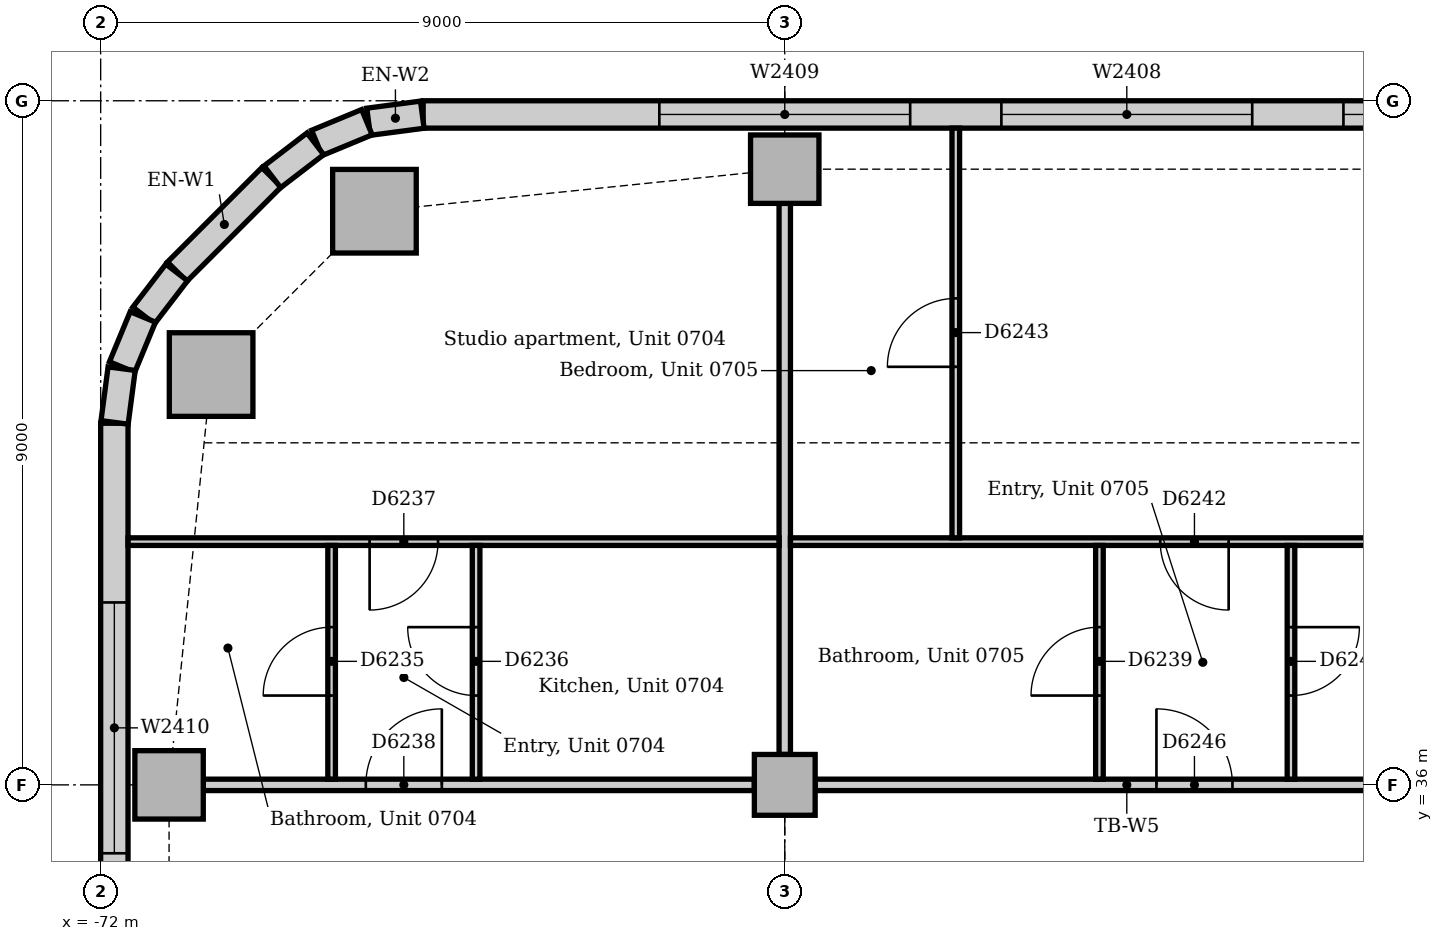
"""IFC4 building model, lengths in metres.
Left out: names, types, materials, properties, quantities, classifications, styles, units other than length and angle.
Written with IfcOpenShell. Run it as: python <this file> out.ifc"""

import sys

from ifc_helpers import new_model, si_unit, direction, frame, frame_2d, origin, origin_2d, place, context, subcontext, project, spatial, rectangle, extrude, element, fill, save


model = new_model("IFC4")
c1 = context("Model", 3, precision=1e-05, world=origin(), true_north=direction((0.0, 1.0)))
c2 = subcontext(c1, "Body", "Model", "MODEL_VIEW")
j1 = project(units=[si_unit("LENGTHUNIT", "METRE"), si_unit("PLANEANGLEUNIT", "RADIAN")], contexts=[c1])
p1 = place(None, origin())
s1 = spatial("IfcSite", under=j1, at=p1, CompositionType="ELEMENT")
p2 = place(p1, origin())
s2 = spatial("IfcBuilding", under=s1, at=p2, CompositionType="ELEMENT")
p3 = place(p2, frame((0.0, 0.0, 34.0)))
s3 = spatial("IfcBuildingStorey", under=s2, at=p3, CompositionType="ELEMENT", Elevation=34.0)
for number, where, z_axis, x_axis in (
    (1, (-68.398, 43.547, 0.0), (0.0, 0.0, 1.0), (1.0, 0.0, 0.0)),
    (2, (-70.547, 41.398, 0.0), (0.0, 0.0, 1.0), (1.0, 0.0, 0.0)),
):
    element("IfcColumn", number, at=place(p3, frame(where, z_axis=z_axis, x_axis=x_axis)), inside=s3, PredefinedType="COLUMN", context=c2, shape_type="SweptSolid", body=[
        extrude(rectangle(XDim=1.1, YDim=1.1, at=origin_2d()), origin(), (0.0, 0.0, 1.0), 3.85),
    ])
for number, where, z_axis, x_axis in (
    (3, (-63.0, 44.1, 0.0), (0.0, 0.0, 1.0), (1.0, 0.0, 0.0)),
    (4, (-71.1, 36.0, 0.0), (0.0, 0.0, 1.0), (1.0, 0.0, 0.0)),
):
    element("IfcColumn", number, at=place(p3, frame(where, z_axis=z_axis, x_axis=x_axis)), inside=s3, PredefinedType="COLUMN", context=c2, shape_type="SweptSolid", body=[
        extrude(rectangle(XDim=0.9, YDim=0.9, at=origin_2d()), origin(), (0.0, 0.0, 1.0), 3.85),
    ])
p4 = place(p3, frame((-63.0, 36.0, 0.0), z_axis=(0.0, 0.0, 1.0), x_axis=(1.0, 0.0, 0.0)))
e5 = element("IfcColumn", 5, at=p4, inside=s3, PredefinedType="COLUMN", context=c2, shape_type="SweptSolid", body=[
    extrude(rectangle(XDim=0.8, YDim=0.8, at=origin_2d()), origin(), (0.0, 0.0, 1.0), 3.85),
])
p5 = place(p3, frame((-31.243, 44.82, 0.0), z_axis=(0.0, 0.0, 1.0), x_axis=(-1.0, 0.0, 0.0)))
e6 = element("IfcWall", 6, at=p5, inside=s3, PredefinedType="STANDARD", context=c2, shape_type="SweptSolid", body=[
    extrude(rectangle(XDim=36.515, YDim=0.36, at=frame_2d((18.257, 0.0))), origin(), (0.0, 0.0, 1.0), 3.85),
])
p6 = place(p5, frame((3.107, 0.0, 0.9)))
e7 = element("IfcOpeningElement", 7, at=p6, cuts=e6, PredefinedType="OPENING", context=c2, shape_type="SweptSolid", body=[
    extrude(rectangle(XDim=3.3, YDim=1.6, at=frame_2d((1.65, 0.8))), frame((0.0, 0.19, 0.0), z_axis=(0.0, -1.0, 0.0), x_axis=(1.0, 0.0, 0.0)), (0.0, 0.0, 1.0), 0.38),
])
p7 = place(p5, frame((7.607, 0.0, 0.9)))
e8 = element("IfcOpeningElement", 8, at=p7, cuts=e6, PredefinedType="OPENING", context=c2, shape_type="SweptSolid", body=[
    extrude(rectangle(XDim=3.3, YDim=1.6, at=frame_2d((1.65, 0.8))), frame((0.0, 0.19, 0.0), z_axis=(0.0, -1.0, 0.0), x_axis=(1.0, 0.0, 0.0)), (0.0, 0.0, 1.0), 0.38),
])
p8 = place(p5, frame((12.107, 0.0, 0.9)))
e9 = element("IfcOpeningElement", 9, at=p8, cuts=e6, PredefinedType="OPENING", context=c2, shape_type="SweptSolid", body=[
    extrude(rectangle(XDim=3.3, YDim=1.6, at=frame_2d((1.65, 0.8))), frame((0.0, 0.19, 0.0), z_axis=(0.0, -1.0, 0.0), x_axis=(1.0, 0.0, 0.0)), (0.0, 0.0, 1.0), 0.38),
])
p9 = place(p5, frame((16.607, 0.0, 0.9)))
e10 = element("IfcOpeningElement", 10, at=p9, cuts=e6, PredefinedType="OPENING", context=c2, shape_type="SweptSolid", body=[
    extrude(rectangle(XDim=3.3, YDim=1.6, at=frame_2d((1.65, 0.8))), frame((0.0, 0.19, 0.0), z_axis=(0.0, -1.0, 0.0), x_axis=(1.0, 0.0, 0.0)), (0.0, 0.0, 1.0), 0.38),
])
p10 = place(p5, frame((21.107, 0.0, 0.9)))
e11 = element("IfcOpeningElement", 11, at=p10, cuts=e6, PredefinedType="OPENING", context=c2, shape_type="SweptSolid", body=[
    extrude(rectangle(XDim=3.3, YDim=1.6, at=frame_2d((1.65, 0.8))), frame((0.0, 0.19, 0.0), z_axis=(0.0, -1.0, 0.0), x_axis=(1.0, 0.0, 0.0)), (0.0, 0.0, 1.0), 0.38),
])
p11 = place(p5, frame((25.607, 0.0, 0.9)))
e12 = element("IfcOpeningElement", 12, at=p11, cuts=e6, PredefinedType="OPENING", context=c2, shape_type="SweptSolid", body=[
    extrude(rectangle(XDim=3.3, YDim=1.6, at=frame_2d((1.65, 0.8))), frame((0.0, 0.19, 0.0), z_axis=(0.0, -1.0, 0.0), x_axis=(1.0, 0.0, 0.0)), (0.0, 0.0, 1.0), 0.38),
])
p12 = place(p5, frame((30.107, 0.0, 0.9)))
e13 = element("IfcOpeningElement", 13, at=p12, cuts=e6, PredefinedType="OPENING", context=c2, shape_type="SweptSolid", body=[
    extrude(rectangle(XDim=3.3, YDim=1.6, at=frame_2d((1.65, 0.8))), frame((0.0, 0.19, 0.0), z_axis=(0.0, -1.0, 0.0), x_axis=(1.0, 0.0, 0.0)), (0.0, 0.0, 1.0), 0.38),
])
p13 = place(p3, frame((-69.751, 43.994, 0.0), z_axis=(0.0, 0.0, 1.0), x_axis=(-0.707106781187, -0.707106781187, 0.0)))
e14 = element("IfcWall", 14, at=p13, inside=s3, PredefinedType="STANDARD", context=c2, shape_type="SweptSolid", body=[
    extrude(rectangle(XDim=1.757, YDim=0.36, at=frame_2d((0.879, 0.0))), origin(), (0.0, 0.0, 1.0), 3.85),
])
p14 = place(p3, frame((-71.82, 40.757, 0.0), z_axis=(0.0, 0.0, 1.0), x_axis=(0.0, -1.0, 0.0)))
e15 = element("IfcWall", 15, at=p14, inside=s3, PredefinedType="STANDARD", context=c2, shape_type="SweptSolid", body=[
    extrude(rectangle(XDim=26.015, YDim=0.36, at=frame_2d((13.007, 0.0))), origin(), (0.0, 0.0, 1.0), 3.85),
])
p15 = place(p14, frame((2.357, 0.0, 0.9)))
e16 = element("IfcOpeningElement", 16, at=p15, cuts=e15, PredefinedType="OPENING", context=c2, shape_type="SweptSolid", body=[
    extrude(rectangle(XDim=3.3, YDim=1.6, at=frame_2d((1.65, 0.8))), frame((0.0, 0.19, 0.0), z_axis=(0.0, -1.0, 0.0), x_axis=(1.0, 0.0, 0.0)), (0.0, 0.0, 1.0), 0.38),
])
p16 = place(p14, frame((7.057, 0.0, 0.9)))
e17 = element("IfcOpeningElement", 17, at=p16, cuts=e15, PredefinedType="OPENING", context=c2, shape_type="SweptSolid", body=[
    extrude(rectangle(XDim=3.3, YDim=1.6, at=frame_2d((1.65, 0.8))), frame((0.0, 0.19, 0.0), z_axis=(0.0, -1.0, 0.0), x_axis=(1.0, 0.0, 0.0)), (0.0, 0.0, 1.0), 0.38),
])
p17 = place(p14, frame((11.357, 0.0, 0.9)))
e18 = element("IfcOpeningElement", 18, at=p17, cuts=e15, PredefinedType="OPENING", context=c2, shape_type="SweptSolid", body=[
    extrude(rectangle(XDim=3.3, YDim=1.6, at=frame_2d((1.65, 0.8))), frame((0.0, 0.19, 0.0), z_axis=(0.0, -1.0, 0.0), x_axis=(1.0, 0.0, 0.0)), (0.0, 0.0, 1.0), 0.38),
])
p18 = place(p14, frame((15.857, 0.0, 0.9)))
e19 = element("IfcOpeningElement", 19, at=p18, cuts=e15, PredefinedType="OPENING", context=c2, shape_type="SweptSolid", body=[
    extrude(rectangle(XDim=3.3, YDim=1.6, at=frame_2d((1.65, 0.8))), frame((0.0, 0.19, 0.0), z_axis=(0.0, -1.0, 0.0), x_axis=(1.0, 0.0, 0.0)), (0.0, 0.0, 1.0), 0.38),
])
p19 = place(p14, frame((20.957, 0.0, 0.9)))
e20 = element("IfcOpeningElement", 20, at=p19, cuts=e15, PredefinedType="OPENING", context=c2, shape_type="SweptSolid", body=[
    extrude(rectangle(XDim=3.3, YDim=1.6, at=frame_2d((1.65, 0.8))), frame((0.0, 0.19, 0.0), z_axis=(0.0, -1.0, 0.0), x_axis=(1.0, 0.0, 0.0)), (0.0, 0.0, 1.0), 0.38),
])
for number, where, z_axis, x_axis in (
    (21, (-67.769, 44.817, 0.0), (0.0, 0.0, 1.0), (-0.991, -0.131, 0.0)),
    (22, (-68.497, 44.718, 0.0), (0.0, 0.0, 1.0), (-0.924, -0.383, 0.0)),
):
    element("IfcWall", number, at=place(p3, frame(where, z_axis=z_axis, x_axis=x_axis)), inside=s3, PredefinedType="STANDARD", context=c2, shape_type="SweptSolid", body=[
        extrude(rectangle(XDim=0.713, YDim=0.36, at=frame_2d((0.356, 0.0))), origin(), (0.0, 0.0, 1.0), 3.85),
    ])
for number, where, z_axis, x_axis in (
    (23, (-69.175, 44.434, 0.0), (0.0, 0.0, 1.0), (-0.793, -0.609, 0.0)),
    (24, (-71.0, 42.741, 0.0), (0.0, 0.0, 1.0), (-0.609, -0.793, 0.0)),
):
    element("IfcWall", number, at=place(p3, frame(where, z_axis=z_axis, x_axis=x_axis)), inside=s3, PredefinedType="STANDARD", context=c2, shape_type="SweptSolid", body=[
        extrude(rectangle(XDim=0.713, YDim=0.36, at=frame_2d((0.357, 0.0))), origin(), (0.0, 0.0, 1.0), 3.85),
    ])
for number, where, z_axis, x_axis in (
    (25, (-71.445, 42.156, 0.0), (0.0, 0.0, 1.0), (-0.383, -0.924, 0.0)),
    (26, (-71.724, 41.476, 0.0), (0.0, 0.0, 1.0), (-0.131, -0.991, 0.0)),
):
    element("IfcWall", number, at=place(p3, frame(where, z_axis=z_axis, x_axis=x_axis)), inside=s3, PredefinedType="STANDARD", context=c2, shape_type="SweptSolid", body=[
        extrude(rectangle(XDim=0.713, YDim=0.36, at=frame_2d((0.356, 0.0))), origin(), (0.0, 0.0, 1.0), 3.85),
    ])
p20 = place(p3, frame((-62.6, 36.0, 0.0), z_axis=(0.0, 0.0, 1.0), x_axis=(1.0, 0.0, 0.0)))
e27 = element("IfcWall", 27, at=p20, inside=s3, PredefinedType="PARTITIONING", context=c2, shape_type="SweptSolid", body=[
    extrude(rectangle(XDim=8.2, YDim=0.15, at=frame_2d((4.1, 0.0))), origin(), (0.0, 0.0, 1.0), 3.15),
])
p21 = place(p20, frame((4.49, 0.0, 0.0)))
e28 = element("IfcOpeningElement", 28, at=p21, cuts=e27, PredefinedType="OPENING", context=c2, shape_type="SweptSolid", body=[
    extrude(rectangle(XDim=1.0, YDim=2.1, at=frame_2d((0.5, 1.05))), frame((0.0, 0.085, 0.0), z_axis=(0.0, -1.0, 0.0), x_axis=(1.0, 0.0, 0.0)), (0.0, 0.0, 1.0), 0.17),
])
p22 = place(p3, frame((-70.65, 36.0, 0.0), z_axis=(0.0, 0.0, 1.0), x_axis=(1.0, 0.0, 0.0)))
e29 = element("IfcWall", 29, at=p22, inside=s3, PredefinedType="PARTITIONING", context=c2, shape_type="SweptSolid", body=[
    extrude(rectangle(XDim=7.25, YDim=0.15, at=frame_2d((3.625, 0.0))), origin(), (0.0, 0.0, 1.0), 3.15),
])
p23 = place(p22, frame((2.138, 0.0, 0.0)))
e30 = element("IfcOpeningElement", 30, at=p23, cuts=e29, PredefinedType="OPENING", context=c2, shape_type="SweptSolid", body=[
    extrude(rectangle(XDim=1.0, YDim=2.1, at=frame_2d((0.5, 1.05))), frame((0.0, 0.085, 0.0), z_axis=(0.0, -1.0, 0.0), x_axis=(1.0, 0.0, 0.0)), (0.0, 0.0, 1.0), 0.17),
])
p24 = place(p3, frame((-63.0, 36.4, 0.0), z_axis=(0.0, 0.0, 1.0), x_axis=(0.0, 1.0, 0.0)))
e31 = element("IfcWall", 31, at=p24, inside=s3, PredefinedType="PARTITIONING", context=c2, shape_type="SweptSolid", body=[
    extrude(rectangle(XDim=7.25, YDim=0.15, at=frame_2d((3.625, 0.0))), origin(), (0.0, 0.0, 1.0), 3.158),
])
p25 = place(p3, frame((-62.925, 39.2, 0.0), z_axis=(0.0, 0.0, 1.0), x_axis=(1.0, 0.0, 0.0)))
e32 = element("IfcWall", 32, at=p25, inside=s3, PredefinedType="PARTITIONING", context=c2, shape_type="SweptSolid", body=[
    extrude(rectangle(XDim=17.975, YDim=0.1, at=frame_2d((8.988, 0.0))), origin(), (0.0, 0.0, 1.0), 3.85),
])
p26 = place(p25, frame((11.635, 0.0, 0.0)))
e33 = element("IfcOpeningElement", 33, at=p26, cuts=e32, PredefinedType="OPENING", context=c2, shape_type="SweptSolid", body=[
    extrude(rectangle(XDim=0.9, YDim=2.1, at=frame_2d((0.45, 1.05))), frame((0.0, 0.06, 0.0), z_axis=(0.0, -1.0, 0.0), x_axis=(1.0, 0.0, 0.0)), (0.0, 0.0, 1.0), 0.12),
])
p27 = place(p25, frame((4.865, 0.0, 0.0)))
e34 = element("IfcOpeningElement", 34, at=p27, cuts=e32, PredefinedType="OPENING", context=c2, shape_type="SweptSolid", body=[
    extrude(rectangle(XDim=0.9, YDim=2.1, at=frame_2d((0.45, 1.05))), frame((0.0, 0.06, 0.0), z_axis=(0.0, -1.0, 0.0), x_axis=(1.0, 0.0, 0.0)), (0.0, 0.0, 1.0), 0.12),
])
p28 = place(p25, frame((16.275, 0.0, 0.0)))
e35 = element("IfcOpeningElement", 35, at=p28, cuts=e32, PredefinedType="OPENING", context=c2, shape_type="SweptSolid", body=[
    extrude(rectangle(XDim=0.9, YDim=2.1, at=frame_2d((0.45, 1.05))), frame((0.0, 0.06, 0.0), z_axis=(0.0, -1.0, 0.0), x_axis=(1.0, 0.0, 0.0)), (0.0, 0.0, 1.0), 0.12),
])
p29 = place(p3, frame((-71.64, 39.2, 0.0), z_axis=(0.0, 0.0, 1.0), x_axis=(1.0, 0.0, 0.0)))
e36 = element("IfcWall", 36, at=p29, inside=s3, PredefinedType="PARTITIONING", context=c2, shape_type="SweptSolid", body=[
    extrude(rectangle(XDim=8.565, YDim=0.1, at=frame_2d((4.282, 0.0))), origin(), (0.0, 0.0, 1.0), 3.85),
])
p30 = place(p29, frame((3.178, 0.0, 0.0)))
e37 = element("IfcOpeningElement", 37, at=p30, cuts=e36, PredefinedType="OPENING", context=c2, shape_type="SweptSolid", body=[
    extrude(rectangle(XDim=0.9, YDim=2.1, at=frame_2d((0.45, 1.05))), frame((0.0, 0.06, 0.0), z_axis=(0.0, -1.0, 0.0), x_axis=(1.0, 0.0, 0.0)), (0.0, 0.0, 1.0), 0.12),
])
p31 = place(p3, frame((-60.75, 39.25, 0.0), z_axis=(0.0, 0.0, 1.0), x_axis=(0.0, 1.0, 0.0)))
e38 = element("IfcWall", 38, at=p31, inside=s3, PredefinedType="PARTITIONING", context=c2, shape_type="SweptSolid", body=[
    extrude(rectangle(XDim=5.39, YDim=0.1, at=frame_2d((2.695, 0.0))), origin(), (0.0, 0.0, 1.0), 3.85),
])
p32 = place(p31, frame((2.25, 0.0, 0.0)))
e39 = element("IfcOpeningElement", 39, at=p32, cuts=e38, PredefinedType="OPENING", context=c2, shape_type="SweptSolid", body=[
    extrude(rectangle(XDim=0.9, YDim=2.1, at=frame_2d((0.45, 1.05))), frame((0.0, 0.06, 0.0), z_axis=(0.0, -1.0, 0.0), x_axis=(1.0, 0.0, 0.0)), (0.0, 0.0, 1.0), 0.12),
])
p33 = place(p3, frame((-68.962, 36.075, 0.0), z_axis=(0.0, 0.0, 1.0), x_axis=(0.0, 1.0, 0.0)))
e40 = element("IfcWall", 40, at=p33, inside=s3, PredefinedType="PARTITIONING", context=c2, shape_type="SweptSolid", body=[
    extrude(rectangle(XDim=3.075, YDim=0.1, at=frame_2d((1.538, 0.0))), origin(), (0.0, 0.0, 1.0), 3.85),
])
p34 = place(p33, frame((1.1, 0.0, 0.0)))
e41 = element("IfcOpeningElement", 41, at=p34, cuts=e40, PredefinedType="OPENING", context=c2, shape_type="SweptSolid", body=[
    extrude(rectangle(XDim=0.9, YDim=2.1, at=frame_2d((0.45, 1.05))), frame((0.0, 0.06, 0.0), z_axis=(0.0, -1.0, 0.0), x_axis=(1.0, 0.0, 0.0)), (0.0, 0.0, 1.0), 0.12),
])
p35 = place(p3, frame((-67.061, 36.075, 0.0), z_axis=(0.0, 0.0, 1.0), x_axis=(0.0, 1.0, 0.0)))
e42 = element("IfcWall", 42, at=p35, inside=s3, PredefinedType="PARTITIONING", context=c2, shape_type="SweptSolid", body=[
    extrude(rectangle(XDim=3.075, YDim=0.1, at=frame_2d((1.538, 0.0))), origin(), (0.0, 0.0, 1.0), 3.85),
])
p36 = place(p35, frame((1.1, 0.0, 0.0)))
e43 = element("IfcOpeningElement", 43, at=p36, cuts=e42, PredefinedType="OPENING", context=c2, shape_type="SweptSolid", body=[
    extrude(rectangle(XDim=0.9, YDim=2.1, at=frame_2d((0.45, 1.05))), frame((0.0, 0.06, 0.0), z_axis=(0.0, -1.0, 0.0), x_axis=(1.0, 0.0, 0.0)), (0.0, 0.0, 1.0), 0.12),
])
p37 = place(p3, frame((-58.86, 36.075, 0.0), z_axis=(0.0, 0.0, 1.0), x_axis=(0.0, 1.0, 0.0)))
e44 = element("IfcWall", 44, at=p37, inside=s3, PredefinedType="PARTITIONING", context=c2, shape_type="SweptSolid", body=[
    extrude(rectangle(XDim=3.075, YDim=0.1, at=frame_2d((1.538, 0.0))), origin(), (0.0, 0.0, 1.0), 3.85),
])
p38 = place(p37, frame((1.1, 0.0, 0.0)))
e45 = element("IfcOpeningElement", 45, at=p38, cuts=e44, PredefinedType="OPENING", context=c2, shape_type="SweptSolid", body=[
    extrude(rectangle(XDim=0.9, YDim=2.1, at=frame_2d((0.45, 1.05))), frame((0.0, 0.06, 0.0), z_axis=(0.0, -1.0, 0.0), x_axis=(1.0, 0.0, 0.0)), (0.0, 0.0, 1.0), 0.12),
])
p39 = place(p3, frame((-56.34, 36.075, 0.0), z_axis=(0.0, 0.0, 1.0), x_axis=(0.0, 1.0, 0.0)))
e46 = element("IfcWall", 46, at=p39, inside=s3, PredefinedType="PARTITIONING", context=c2, shape_type="SweptSolid", body=[
    extrude(rectangle(XDim=3.075, YDim=0.1, at=frame_2d((1.538, 0.0))), origin(), (0.0, 0.0, 1.0), 3.85),
])
p40 = place(p39, frame((1.1, 0.0, 0.0)))
e47 = element("IfcOpeningElement", 47, at=p40, cuts=e46, PredefinedType="OPENING", context=c2, shape_type="SweptSolid", body=[
    extrude(rectangle(XDim=0.9, YDim=2.1, at=frame_2d((0.45, 1.05))), frame((0.0, 0.06, 0.0), z_axis=(0.0, -1.0, 0.0), x_axis=(1.0, 0.0, 0.0)), (0.0, 0.0, 1.0), 0.12),
])
p41 = place(p10, origin())
e48 = element("IfcWindow", 48, at=p41, inside=s3, PartitioningType="SINGLE_PANEL", PredefinedType="WINDOW", context=c2, shape_type="SweptSolid", body=[
    extrude(rectangle(XDim=3.3, YDim=1.6, at=frame_2d((1.65, 0.8))), frame((0.0, 0.13, 0.0), z_axis=(0.0, -1.0, 0.0), x_axis=(1.0, 0.0, 0.0)), (0.0, 0.0, 1.0), 0.06),
])
fill(e11, e48)
p42 = place(p11, origin())
e49 = element("IfcWindow", 49, at=p42, inside=s3, PartitioningType="SINGLE_PANEL", PredefinedType="WINDOW", context=c2, shape_type="SweptSolid", body=[
    extrude(rectangle(XDim=3.3, YDim=1.6, at=frame_2d((1.65, 0.8))), frame((0.0, 0.13, 0.0), z_axis=(0.0, -1.0, 0.0), x_axis=(1.0, 0.0, 0.0)), (0.0, 0.0, 1.0), 0.06),
])
fill(e12, e49)
p43 = place(p12, origin())
e50 = element("IfcWindow", 50, at=p43, inside=s3, PartitioningType="SINGLE_PANEL", PredefinedType="WINDOW", context=c2, shape_type="SweptSolid", body=[
    extrude(rectangle(XDim=3.3, YDim=1.6, at=frame_2d((1.65, 0.8))), frame((0.0, 0.13, 0.0), z_axis=(0.0, -1.0, 0.0), x_axis=(1.0, 0.0, 0.0)), (0.0, 0.0, 1.0), 0.06),
])
fill(e13, e50)
p44 = place(p15, origin())
e51 = element("IfcWindow", 51, at=p44, inside=s3, PartitioningType="SINGLE_PANEL", PredefinedType="WINDOW", context=c2, shape_type="SweptSolid", body=[
    extrude(rectangle(XDim=3.3, YDim=1.6, at=frame_2d((1.65, 0.8))), frame((0.0, 0.13, 0.0), z_axis=(0.0, -1.0, 0.0), x_axis=(1.0, 0.0, 0.0)), (0.0, 0.0, 1.0), 0.06),
])
fill(e16, e51)
p45 = place(p34, origin())
e52 = element("IfcDoor", 52, at=p45, inside=s3, OperationType="SINGLE_SWING_LEFT", PredefinedType="DOOR", context=c2, shape_type="SweptSolid", body=[
    extrude(rectangle(XDim=0.9, YDim=2.1, at=frame_2d((0.45, 1.05))), frame((0.0, 0.025, 0.0), z_axis=(0.0, -1.0, 0.0), x_axis=(1.0, 0.0, 0.0)), (0.0, 0.0, 1.0), 0.05),
])
fill(e41, e52)
p46 = place(p36, origin())
e53 = element("IfcDoor", 53, at=p46, inside=s3, OperationType="SINGLE_SWING_RIGHT", PredefinedType="DOOR", context=c2, shape_type="SweptSolid", body=[
    extrude(rectangle(XDim=0.9, YDim=2.1, at=frame_2d((0.45, 1.05))), frame((0.0, 0.025, 0.0), z_axis=(0.0, -1.0, 0.0), x_axis=(1.0, 0.0, 0.0)), (0.0, 0.0, 1.0), 0.05),
])
fill(e43, e53)
p47 = place(p30, frame((0.9, 0.0, 0.0), z_axis=(0.0, 0.0, 1.0), x_axis=(-1.0, 0.0, 0.0)))
e54 = element("IfcDoor", 54, at=p47, inside=s3, OperationType="SINGLE_SWING_RIGHT", PredefinedType="DOOR", context=c2, shape_type="SweptSolid", body=[
    extrude(rectangle(XDim=0.9, YDim=2.1, at=frame_2d((0.45, 1.05))), frame((0.0, 0.025, 0.0), z_axis=(0.0, -1.0, 0.0), x_axis=(1.0, 0.0, 0.0)), (0.0, 0.0, 1.0), 0.05),
])
fill(e37, e54)
p48 = place(p23, origin())
e55 = element("IfcDoor", 55, at=p48, inside=s3, OperationType="SINGLE_SWING_RIGHT", PredefinedType="DOOR", context=c2, shape_type="SweptSolid", body=[
    extrude(rectangle(XDim=1.0, YDim=2.1, at=frame_2d((0.5, 1.05))), frame((0.0, 0.025, 0.0), z_axis=(0.0, -1.0, 0.0), x_axis=(1.0, 0.0, 0.0)), (0.0, 0.0, 1.0), 0.05),
])
fill(e30, e55)
p49 = place(p38, origin())
e56 = element("IfcDoor", 56, at=p49, inside=s3, OperationType="SINGLE_SWING_LEFT", PredefinedType="DOOR", context=c2, shape_type="SweptSolid", body=[
    extrude(rectangle(XDim=0.9, YDim=2.1, at=frame_2d((0.45, 1.05))), frame((0.0, 0.025, 0.0), z_axis=(0.0, -1.0, 0.0), x_axis=(1.0, 0.0, 0.0)), (0.0, 0.0, 1.0), 0.05),
])
fill(e45, e56)
p50 = place(p40, frame((0.9, 0.0, 0.0), z_axis=(0.0, 0.0, 1.0), x_axis=(-1.0, 0.0, 0.0)))
e57 = element("IfcDoor", 57, at=p50, inside=s3, OperationType="SINGLE_SWING_LEFT", PredefinedType="DOOR", context=c2, shape_type="SweptSolid", body=[
    extrude(rectangle(XDim=0.9, YDim=2.1, at=frame_2d((0.45, 1.05))), frame((0.0, 0.025, 0.0), z_axis=(0.0, -1.0, 0.0), x_axis=(1.0, 0.0, 0.0)), (0.0, 0.0, 1.0), 0.05),
])
fill(e47, e57)
p51 = place(p27, frame((0.9, 0.0, 0.0), z_axis=(0.0, 0.0, 1.0), x_axis=(-1.0, 0.0, 0.0)))
e58 = element("IfcDoor", 58, at=p51, inside=s3, OperationType="SINGLE_SWING_LEFT", PredefinedType="DOOR", context=c2, shape_type="SweptSolid", body=[
    extrude(rectangle(XDim=0.9, YDim=2.1, at=frame_2d((0.45, 1.05))), frame((0.0, 0.025, 0.0), z_axis=(0.0, -1.0, 0.0), x_axis=(1.0, 0.0, 0.0)), (0.0, 0.0, 1.0), 0.05),
])
fill(e34, e58)
p52 = place(p32, origin())
e59 = element("IfcDoor", 59, at=p52, inside=s3, OperationType="SINGLE_SWING_LEFT", PredefinedType="DOOR", context=c2, shape_type="SweptSolid", body=[
    extrude(rectangle(XDim=0.9, YDim=2.1, at=frame_2d((0.45, 1.05))), frame((0.0, 0.025, 0.0), z_axis=(0.0, -1.0, 0.0), x_axis=(1.0, 0.0, 0.0)), (0.0, 0.0, 1.0), 0.05),
])
fill(e39, e59)
p53 = place(p21, origin())
e60 = element("IfcDoor", 60, at=p53, inside=s3, OperationType="SINGLE_SWING_LEFT", PredefinedType="DOOR", context=c2, shape_type="SweptSolid", body=[
    extrude(rectangle(XDim=1.0, YDim=2.1, at=frame_2d((0.5, 1.05))), frame((0.0, 0.025, 0.0), z_axis=(0.0, -1.0, 0.0), x_axis=(1.0, 0.0, 0.0)), (0.0, 0.0, 1.0), 0.05),
])
fill(e28, e60)
save(model, sys.argv[1])
